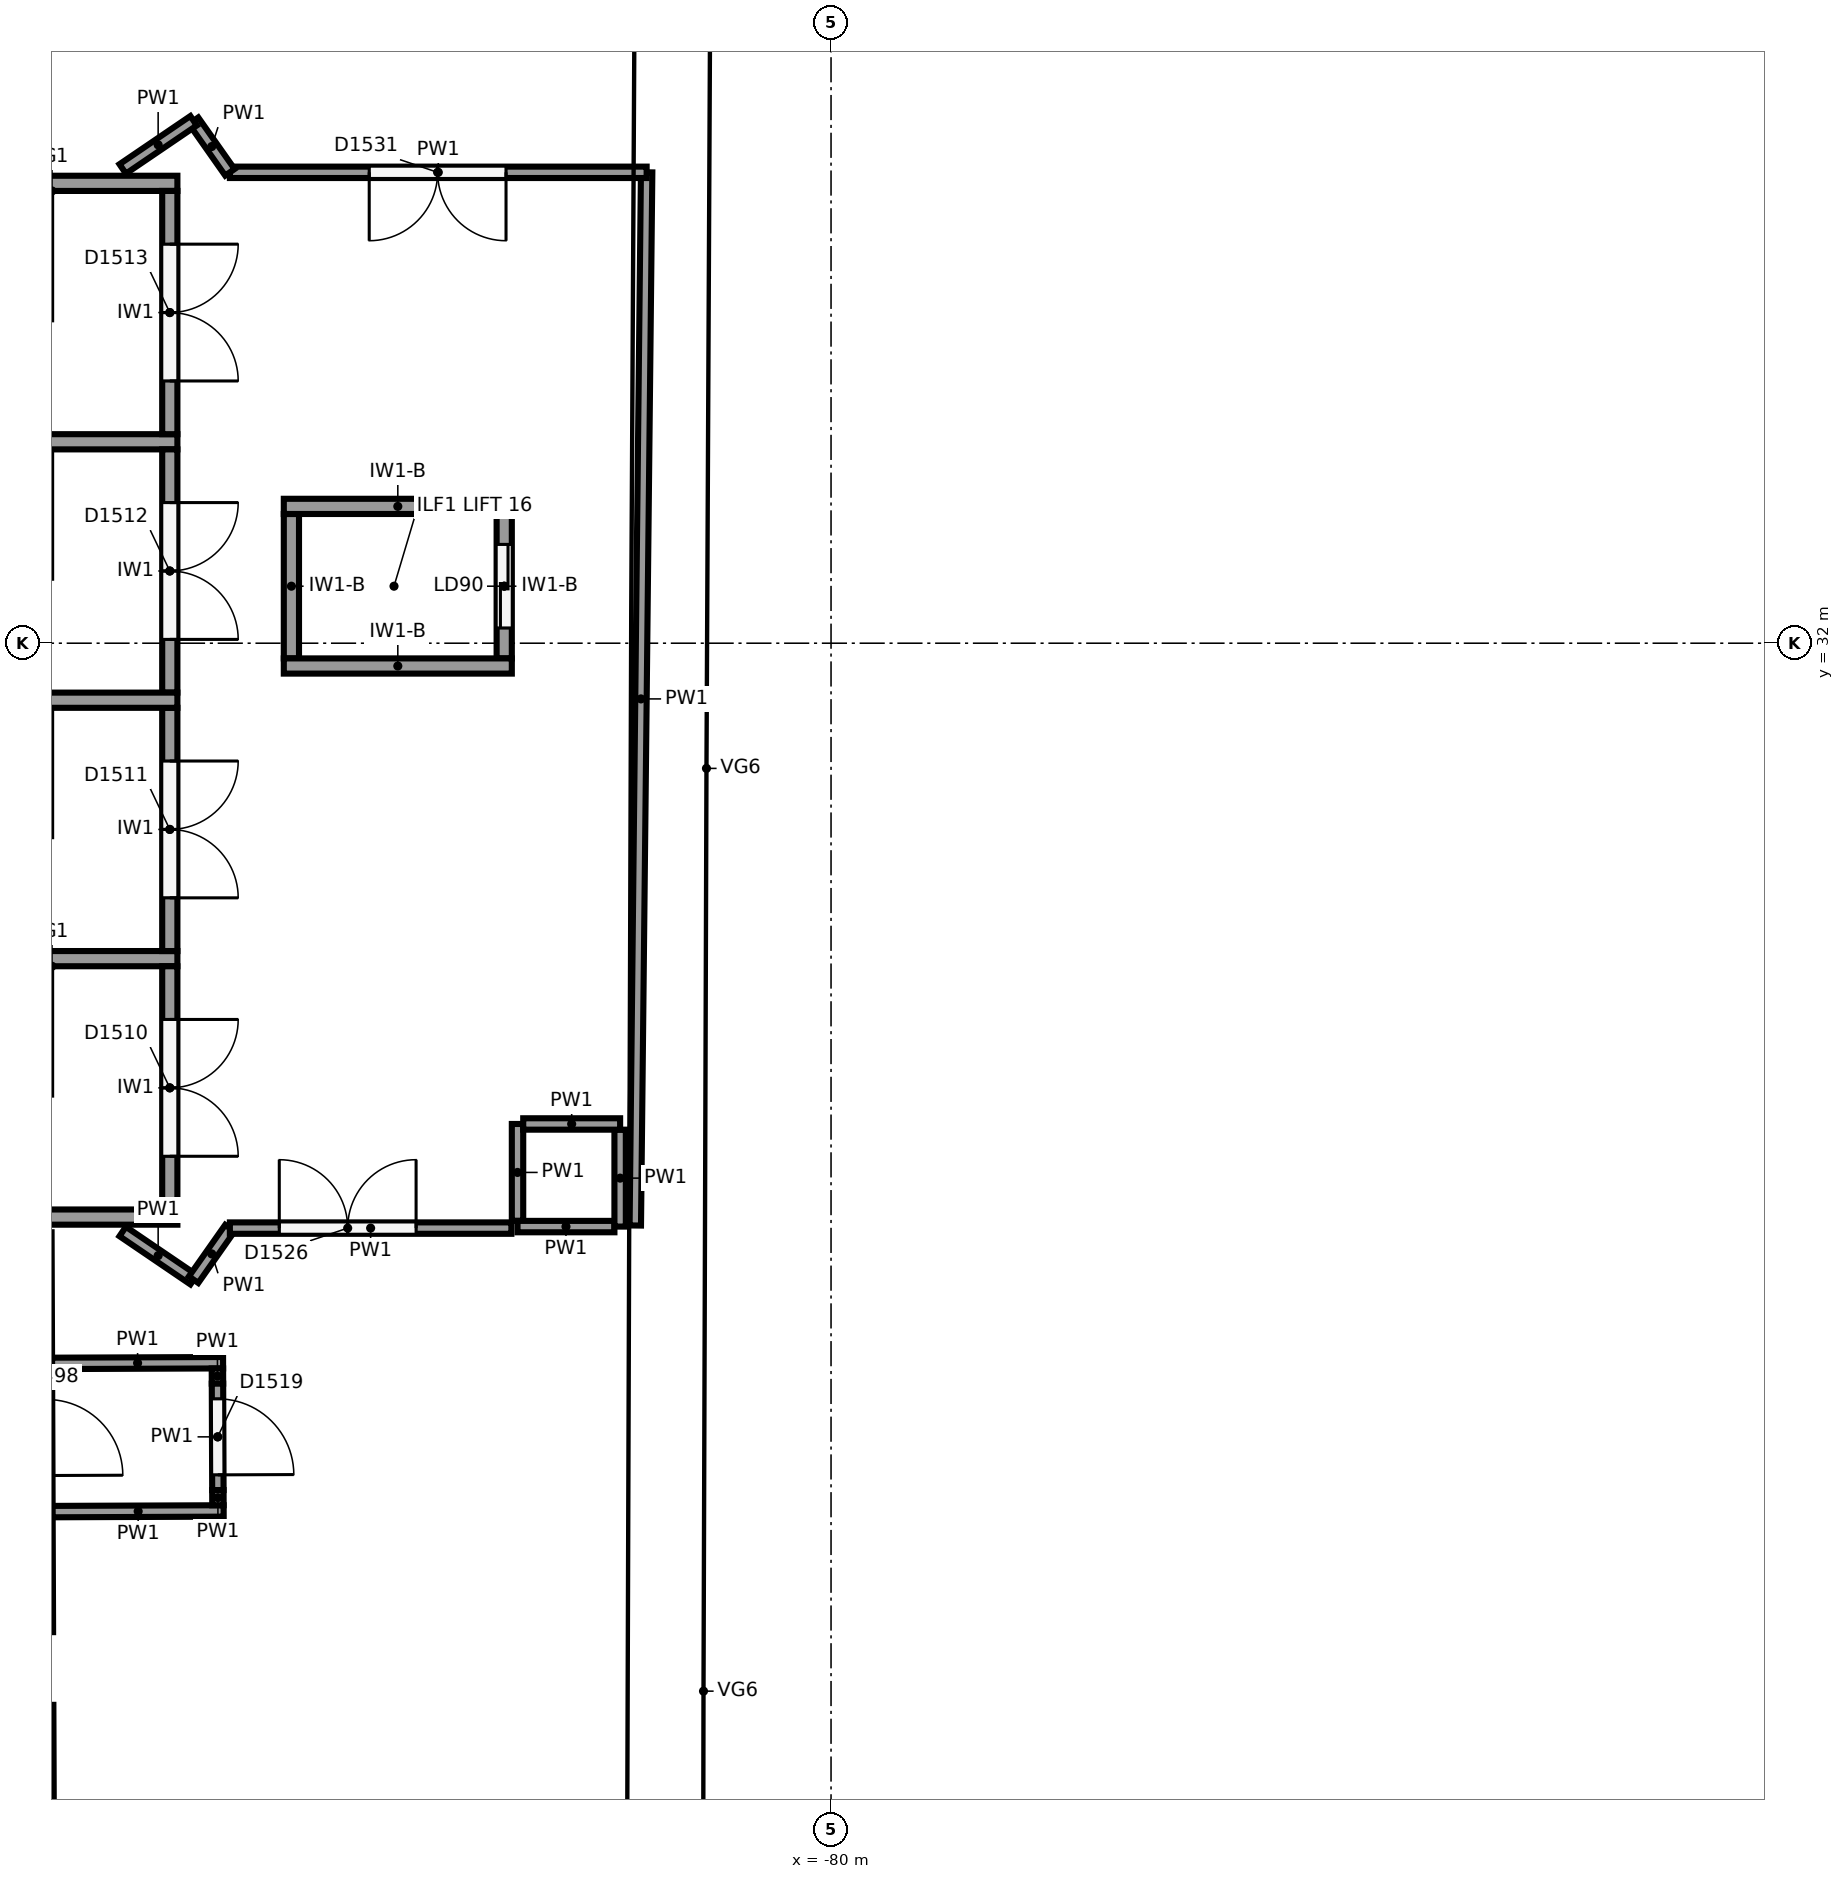
"""IFC4 building model, lengths in metres.
Left out: names, types, materials, properties, quantities, classifications, styles, units other than length and angle.
Written with IfcOpenShell. Run it as: python <this file> out.ifc"""

import sys

from ifc_helpers import new_model, si_unit, direction, frame, frame_2d, origin, origin_2d, place, context, subcontext, project, spatial, rectangle, circle, extrude, element, fill, save


model = new_model("IFC4")
c1 = context("Model", 3, precision=1e-05, world=origin(), true_north=direction((0.0, 1.0)))
c2 = subcontext(c1, "Body", "Model", "MODEL_VIEW")
j1 = project(units=[si_unit("LENGTHUNIT", "METRE"), si_unit("PLANEANGLEUNIT", "RADIAN")], contexts=[c1])
p1 = place(None, origin())
s1 = spatial("IfcSite", under=j1, at=p1, CompositionType="ELEMENT")
p2 = place(p1, origin())
s2 = spatial("IfcBuilding", under=s1, at=p2, CompositionType="ELEMENT")
p3 = place(p2, frame((0.0, 0.0, 24.0)))
s3 = spatial("IfcBuildingStorey", under=s2, at=p3, CompositionType="ELEMENT", Elevation=24.0)
p4 = place(p3, frame((-84.941, 30.404, 0.0), z_axis=(0.0, 0.0, 1.0), x_axis=(1.0, 0.0, 0.0)))
e1 = element("IfcColumn", 1, at=p4, inside=s3, PredefinedType="COLUMN", context=c2, shape_type="SweptSolid", body=[
    extrude(circle(Radius=0.6, at=origin_2d()), origin(), (0.0, 0.0, 1.0), 6.0),
])
p5 = place(p3, frame((-84.973, 18.411, 0.0), z_axis=(0.0, 0.0, 1.0), x_axis=(1.0, 0.0, 0.0)))
e2 = element("IfcColumn", 2, at=p5, inside=s3, PredefinedType="COLUMN", context=c2, shape_type="SweptSolid", body=[
    extrude(circle(Radius=0.5, at=origin_2d()), origin(), (0.0, 0.0, 1.0), 6.0),
])
for number, where, z_axis, x_axis in (
    (3, (-97.6, 38.05, 0.0), (0.0, 0.0, 1.0), (1.0, 0.0, 0.0)),
    (4, (-97.6, 31.25, 0.0), (0.0, 0.0, 1.0), (1.0, 0.0, 0.0)),
    (5, (-97.6, 24.45, 0.0), (0.0, 0.0, 1.0), (1.0, 0.0, 0.0)),
    (6, (-97.6, 34.65, 0.0), (0.0, 0.0, 1.0), (1.0, 0.0, 0.0)),
    (7, (-97.6, 27.85, 0.0), (0.0, 0.0, 1.0), (1.0, 0.0, 0.0)),
):
    element("IfcWall", number, at=place(p3, frame(where, z_axis=z_axis, x_axis=x_axis)), inside=s3, PredefinedType="SHEAR", context=c2, shape_type="SweptSolid", body=[
        extrude(rectangle(XDim=9.0, YDim=0.2, at=frame_2d((4.5, 0.0))), origin(), (0.0, 0.0, 1.0), 5.75),
    ])
p6 = place(p3, frame((-88.7, 37.95, 0.0), z_axis=(0.0, 0.0, 1.0), x_axis=(0.0, -1.0, 0.0)))
e8 = element("IfcWall", 8, at=p6, inside=s3, PredefinedType="SHEAR", context=c2, shape_type="SweptSolid", body=[
    extrude(rectangle(XDim=3.2, YDim=0.2, at=frame_2d((1.6, 0.0))), origin(), (0.0, 0.0, 1.0), 5.75),
])
p7 = place(p6, frame((0.7, 0.0, 0.0)))
e9 = element("IfcOpeningElement", 9, at=p7, cuts=e8, PredefinedType="OPENING", context=c2, shape_type="SweptSolid", body=[
    extrude(rectangle(XDim=1.8, YDim=2.1, at=frame_2d((0.9, 1.05))), frame((0.0, 0.11, 0.0), z_axis=(0.0, -1.0, 0.0), x_axis=(1.0, 0.0, 0.0)), (0.0, 0.0, 1.0), 0.22),
])
p8 = place(p3, frame((-88.7, 34.55, 0.0), z_axis=(0.0, 0.0, 1.0), x_axis=(0.0, -1.0, 0.0)))
e10 = element("IfcWall", 10, at=p8, inside=s3, PredefinedType="SHEAR", context=c2, shape_type="SweptSolid", body=[
    extrude(rectangle(XDim=3.2, YDim=0.2, at=frame_2d((1.6, 0.0))), origin(), (0.0, 0.0, 1.0), 5.75),
])
p9 = place(p8, frame((0.7, 0.0, 0.0)))
e11 = element("IfcOpeningElement", 11, at=p9, cuts=e10, PredefinedType="OPENING", context=c2, shape_type="SweptSolid", body=[
    extrude(rectangle(XDim=1.8, YDim=2.1, at=frame_2d((0.9, 1.05))), frame((0.0, 0.11, 0.0), z_axis=(0.0, -1.0, 0.0), x_axis=(1.0, 0.0, 0.0)), (0.0, 0.0, 1.0), 0.22),
])
p10 = place(p3, frame((-88.7, 31.15, 0.0), z_axis=(0.0, 0.0, 1.0), x_axis=(0.0, -1.0, 0.0)))
e12 = element("IfcWall", 12, at=p10, inside=s3, PredefinedType="SHEAR", context=c2, shape_type="SweptSolid", body=[
    extrude(rectangle(XDim=3.2, YDim=0.2, at=frame_2d((1.6, 0.0))), origin(), (0.0, 0.0, 1.0), 5.75),
])
p11 = place(p10, frame((0.7, 0.0, 0.0)))
e13 = element("IfcOpeningElement", 13, at=p11, cuts=e12, PredefinedType="OPENING", context=c2, shape_type="SweptSolid", body=[
    extrude(rectangle(XDim=1.8, YDim=2.1, at=frame_2d((0.9, 1.05))), frame((0.0, 0.11, 0.0), z_axis=(0.0, -1.0, 0.0), x_axis=(1.0, 0.0, 0.0)), (0.0, 0.0, 1.0), 0.22),
])
p12 = place(p3, frame((-88.7, 27.75, 0.0), z_axis=(0.0, 0.0, 1.0), x_axis=(0.0, -1.0, 0.0)))
e14 = element("IfcWall", 14, at=p12, inside=s3, PredefinedType="SHEAR", context=c2, shape_type="SweptSolid", body=[
    extrude(rectangle(XDim=3.2, YDim=0.2, at=frame_2d((1.6, 0.0))), origin(), (0.0, 0.0, 1.0), 5.75),
])
p13 = place(p12, frame((0.7, 0.0, 0.0)))
e15 = element("IfcOpeningElement", 15, at=p13, cuts=e14, PredefinedType="OPENING", context=c2, shape_type="SweptSolid", body=[
    extrude(rectangle(XDim=1.8, YDim=2.1, at=frame_2d((0.9, 1.05))), frame((0.0, 0.11, 0.0), z_axis=(0.0, -1.0, 0.0), x_axis=(1.0, 0.0, 0.0)), (0.0, 0.0, 1.0), 0.22),
])
for number, where, z_axis, x_axis in (
    (16, (-87.2, 33.8, 0.0), (0.0, 0.0, 1.0), (1.0, 0.0, 0.0)),
    (17, (-87.2, 31.7, 0.0), (0.0, 0.0, 1.0), (1.0, 0.0, 0.0)),
):
    element("IfcWall", number, at=place(p3, frame(where, z_axis=z_axis, x_axis=x_axis)), inside=s3, PredefinedType="SHEAR", context=c2, shape_type="SweptSolid", body=[
        extrude(rectangle(XDim=3.0, YDim=0.2, at=frame_2d((1.5, 0.0))), origin(), (0.0, 0.0, 1.0), 4.6),
    ])
p14 = place(p3, frame((-87.1, 33.7, 0.0), z_axis=(0.0, 0.0, 1.0), x_axis=(0.0, -1.0, 0.0)))
e18 = element("IfcWall", 18, at=p14, inside=s3, PredefinedType="SHEAR", context=c2, shape_type="SweptSolid", body=[
    extrude(rectangle(XDim=1.9, YDim=0.2, at=frame_2d((0.95, 0.0))), origin(), (0.0, 0.0, 1.0), 4.6),
])
p15 = place(p3, frame((-84.3, 33.7, 0.0), z_axis=(0.0, 0.0, 1.0), x_axis=(0.0, -1.0, 0.0)))
e19 = element("IfcWall", 19, at=p15, inside=s3, PredefinedType="SHEAR", context=c2, shape_type="SweptSolid", body=[
    extrude(rectangle(XDim=1.9, YDim=0.2, at=frame_2d((0.95, 0.0))), origin(), (0.0, 0.0, 1.0), 4.6),
])
p16 = place(p15, frame((0.4, 0.0, 0.0)))
e20 = element("IfcOpeningElement", 20, at=p16, cuts=e19, PredefinedType="OPENING", context=c2, shape_type="SweptSolid", body=[
    extrude(rectangle(XDim=1.1, YDim=2.1, at=frame_2d((0.55, 1.05))), frame((0.0, 0.11, 0.0), z_axis=(0.0, -1.0, 0.0), x_axis=(1.0, 0.0, 0.0)), (0.0, 0.0, 1.0), 0.22),
])
p17 = place(p3, frame((-90.33, 24.25, 0.0), z_axis=(0.0, 0.0, 1.0), x_axis=(0.003805253437, -0.999992759997, 0.0)))
e21 = element("IfcWall", 21, at=p17, inside=s3, PredefinedType="PARTITIONING", context=c2, shape_type="SweptSolid", body=[
    extrude(rectangle(XDim=5.261, YDim=0.15, at=frame_2d((2.63, 0.0))), origin(), (0.0, 0.0, 1.0), 5.4),
])
p18 = place(p17, frame((2.2, 0.0, 0.0)))
e22 = element("IfcOpeningElement", 22, at=p18, cuts=e21, PredefinedType="OPENING", context=c2, shape_type="SweptSolid", body=[
    extrude(rectangle(XDim=1.0, YDim=2.1, at=frame_2d((0.5, 1.05))), frame((0.0, 0.085, 0.0), z_axis=(0.0, -1.0, 0.0), x_axis=(1.0, 0.0, 0.0)), (0.0, 0.0, 1.0), 0.17),
])
p19 = place(p3, frame((-90.307, 18.033, 0.0), z_axis=(0.0, 0.0, 1.0), x_axis=(0.003777410518, -0.999992865559, 0.0)))
e23 = element("IfcWall", 23, at=p19, inside=s3, PredefinedType="PARTITIONING", context=c2, shape_type="SweptSolid", body=[
    extrude(rectangle(XDim=4.783, YDim=0.15, at=frame_2d((2.391, 0.0))), origin(), (0.0, 0.0, 1.0), 5.4),
])
p20 = place(p3, frame((-84.125, 25.675, 0.0), z_axis=(0.0, 0.0, 1.0), x_axis=(0.0, -1.0, 0.0)))
e24 = element("IfcWall", 24, at=p20, inside=s3, PredefinedType="PARTITIONING", context=c2, shape_type="SweptSolid", body=[
    extrude(rectangle(XDim=1.275, YDim=0.15, at=frame_2d((0.638, 0.0))), origin(), (0.0, 0.0, 1.0), 5.4),
])
p21 = place(p3, frame((-84.125, 24.325, 0.0), z_axis=(0.0, 0.0, 1.0), x_axis=(1.0, 0.0, 0.0)))
e25 = element("IfcWall", 25, at=p21, inside=s3, PredefinedType="PARTITIONING", context=c2, shape_type="SweptSolid", body=[
    extrude(rectangle(XDim=1.275, YDim=0.15, at=frame_2d((0.637, 0.0))), origin(), (0.0, 0.0, 1.0), 5.4),
])
for number, where, z_axis, x_axis in (
    (26, (-82.775, 24.325, 0.0), (0.0, 0.0, 1.0), (0.0, 1.0, 0.0)),
    (27, (-82.775, 25.675, 0.0), (0.0, 0.0, 1.0), (-1.0, 0.0, 0.0)),
):
    element("IfcWall", number, at=place(p3, frame(where, z_axis=z_axis, x_axis=x_axis)), inside=s3, PredefinedType="PARTITIONING", context=c2, shape_type="SweptSolid", body=[
        extrude(rectangle(XDim=1.275, YDim=0.15, at=frame_2d((0.638, 0.0))), origin(), (0.0, 0.0, 1.0), 5.4),
    ])
p22 = place(p3, frame((-89.32, 24.26, 0.0), z_axis=(0.0, 0.0, 1.0), x_axis=(0.827055308354, -0.562120553728, 0.0)))
e28 = element("IfcWall", 28, at=p22, inside=s3, PredefinedType="PARTITIONING", context=c2, shape_type="SweptSolid", body=[
    extrude(rectangle(XDim=1.128, YDim=0.15, at=frame_2d((0.564, 0.0))), origin(), (0.0, 0.0, 1.0), 5.4),
])
p23 = place(p3, frame((-88.387, 23.626, 0.0), z_axis=(0.0, 0.0, 1.0), x_axis=(0.575376756214, 0.817888493872, 0.0)))
e29 = element("IfcWall", 29, at=p23, inside=s3, PredefinedType="PARTITIONING", context=c2, shape_type="SweptSolid", body=[
    extrude(rectangle(XDim=0.83, YDim=0.15, at=frame_2d((0.415, 0.0))), origin(), (0.0, 0.0, 1.0), 5.4),
])
p24 = place(p3, frame((-87.909, 24.305, 0.0), z_axis=(0.0, 0.0, 1.0), x_axis=(1.0, 0.0, 0.0)))
e30 = element("IfcWall", 30, at=p24, inside=s3, PredefinedType="PARTITIONING", context=c2, shape_type="SweptSolid", body=[
    extrude(rectangle(XDim=3.704, YDim=0.15, at=frame_2d((1.852, 0.0))), origin(), (0.0, 0.0, 1.0), 5.4),
])
p25 = place(p24, frame((0.65, 0.0, 0.0)))
e31 = element("IfcOpeningElement", 31, at=p25, cuts=e30, PredefinedType="OPENING", context=c2, shape_type="SweptSolid", body=[
    extrude(rectangle(XDim=1.8, YDim=2.1, at=frame_2d((0.9, 1.05))), frame((0.0, 0.085, 0.0), z_axis=(0.0, -1.0, 0.0), x_axis=(1.0, 0.0, 0.0)), (0.0, 0.0, 1.0), 0.17),
])
p26 = place(p3, frame((-82.575, 24.339, 0.0), z_axis=(0.0, 0.0, 1.0), x_axis=(0.010765137173, 0.999942054232, 0.0)))
e32 = element("IfcWall", 32, at=p26, inside=s3, PredefinedType="PARTITIONING", context=c2, shape_type="SweptSolid", body=[
    extrude(rectangle(XDim=13.857, YDim=0.15, at=frame_2d((6.928, 0.0))), origin(), (0.0, 0.0, 1.0), 5.4),
])
p27 = place(p3, frame((-82.426, 38.195, 0.0), z_axis=(0.0, 0.0, 1.0), x_axis=(-1.0, 0.0, 0.0)))
e33 = element("IfcWall", 33, at=p27, inside=s3, PredefinedType="PARTITIONING", context=c2, shape_type="SweptSolid", body=[
    extrude(rectangle(XDim=5.483, YDim=0.15, at=frame_2d((2.741, 0.0))), origin(), (0.0, 0.0, 1.0), 5.4),
])
p28 = place(p27, frame((1.85, 0.0, 0.0)))
e34 = element("IfcOpeningElement", 34, at=p28, cuts=e33, PredefinedType="OPENING", context=c2, shape_type="SweptSolid", body=[
    extrude(rectangle(XDim=1.8, YDim=2.1, at=frame_2d((0.9, 1.05))), frame((0.0, 0.085, 0.0), z_axis=(0.0, -1.0, 0.0), x_axis=(1.0, 0.0, 0.0)), (0.0, 0.0, 1.0), 0.17),
])
p29 = place(p3, frame((-87.909, 38.195, 0.0), z_axis=(0.0, 0.0, 1.0), x_axis=(-0.575573582652, 0.81774999294, 0.0)))
e35 = element("IfcWall", 35, at=p29, inside=s3, PredefinedType="PARTITIONING", context=c2, shape_type="SweptSolid", body=[
    extrude(rectangle(XDim=0.83, YDim=0.15, at=frame_2d((0.415, 0.0))), origin(), (0.0, 0.0, 1.0), 5.4),
])
p30 = place(p3, frame((-88.387, 38.874, 0.0), z_axis=(0.0, 0.0, 1.0), x_axis=(-0.827055308354, -0.562120553728, 0.0)))
e36 = element("IfcWall", 36, at=p30, inside=s3, PredefinedType="PARTITIONING", context=c2, shape_type="SweptSolid", body=[
    extrude(rectangle(XDim=1.128, YDim=0.15, at=frame_2d((0.564, 0.0))), origin(), (0.0, 0.0, 1.0), 5.4),
])
for number, where, z_axis, x_axis in (
    (37, (-90.249, 22.525, 0.0), (0.0, 0.0, 1.0), (1.0, 0.004, 0.0)),
    (38, (-90.241, 20.575, 0.0), (0.0, 0.0, 1.0), (1.0, 0.004, 0.0)),
):
    element("IfcWall", number, at=place(p3, frame(where, z_axis=z_axis, x_axis=x_axis)), inside=s3, PredefinedType="PARTITIONING", context=c2, shape_type="SweptSolid", body=[
        extrude(rectangle(XDim=2.25, YDim=0.15, at=frame_2d((1.125, 0.0))), origin(), (0.0, 0.0, 1.0), 5.4),
    ])
p31 = place(p3, frame((-88.073, 22.458, 0.0), z_axis=(0.0, 0.0, 1.0), x_axis=(0.003662979089, -0.99999329127, 0.0)))
e39 = element("IfcWall", 39, at=p31, inside=s3, PredefinedType="PARTITIONING", context=c2, shape_type="SweptSolid", body=[
    extrude(rectangle(XDim=0.2, YDim=0.15, at=frame_2d((0.1, 0.0))), origin(), (0.0, 0.0, 1.0), 5.4),
])
p32 = place(p3, frame((-88.073, 22.259, 0.0), z_axis=(0.0, 0.0, 1.0), x_axis=(0.003836734927, -0.999992639705, 0.0)))
e40 = element("IfcWall", 40, at=p32, inside=s3, PredefinedType="PARTITIONING", context=c2, shape_type="SweptSolid", body=[
    extrude(rectangle(XDim=1.4, YDim=0.15, at=frame_2d((0.7, 0.0))), origin(), (0.0, 0.0, 1.0), 5.4),
])
p33 = place(p32, frame((0.2, 0.0, 0.0)))
e41 = element("IfcOpeningElement", 41, at=p33, cuts=e40, PredefinedType="OPENING", context=c2, shape_type="SweptSolid", body=[
    extrude(rectangle(XDim=1.0, YDim=2.1, at=frame_2d((0.5, 1.05))), frame((0.0, 0.085, 0.0), z_axis=(0.0, -1.0, 0.0), x_axis=(1.0, 0.0, 0.0)), (0.0, 0.0, 1.0), 0.17),
])
p34 = place(p3, frame((-88.067, 20.859, 0.0), z_axis=(0.0, 0.0, 1.0), x_axis=(0.003662979089, -0.99999329127, 0.0)))
e42 = element("IfcWall", 42, at=p34, inside=s3, PredefinedType="PARTITIONING", context=c2, shape_type="SweptSolid", body=[
    extrude(rectangle(XDim=0.2, YDim=0.15, at=frame_2d((0.1, 0.0))), origin(), (0.0, 0.0, 1.0), 5.4),
])
p35 = place(p7, origin())
e43 = element("IfcDoor", 43, at=p35, inside=s3, OperationType="DOUBLE_DOOR_SINGLE_SWING", PredefinedType="DOOR", context=c2, shape_type="SweptSolid", body=[
    extrude(rectangle(XDim=1.8, YDim=2.1, at=frame_2d((0.9, 1.05))), frame((0.0, 0.025, 0.0), z_axis=(0.0, -1.0, 0.0), x_axis=(1.0, 0.0, 0.0)), (0.0, 0.0, 1.0), 0.05),
])
fill(e9, e43)
p36 = place(p9, origin())
e44 = element("IfcDoor", 44, at=p36, inside=s3, OperationType="DOUBLE_DOOR_SINGLE_SWING", PredefinedType="DOOR", context=c2, shape_type="SweptSolid", body=[
    extrude(rectangle(XDim=1.8, YDim=2.1, at=frame_2d((0.9, 1.05))), frame((0.0, 0.025, 0.0), z_axis=(0.0, -1.0, 0.0), x_axis=(1.0, 0.0, 0.0)), (0.0, 0.0, 1.0), 0.05),
])
fill(e11, e44)
p37 = place(p11, origin())
e45 = element("IfcDoor", 45, at=p37, inside=s3, OperationType="DOUBLE_DOOR_SINGLE_SWING", PredefinedType="DOOR", context=c2, shape_type="SweptSolid", body=[
    extrude(rectangle(XDim=1.8, YDim=2.1, at=frame_2d((0.9, 1.05))), frame((0.0, 0.025, 0.0), z_axis=(0.0, -1.0, 0.0), x_axis=(1.0, 0.0, 0.0)), (0.0, 0.0, 1.0), 0.05),
])
fill(e13, e45)
p38 = place(p13, origin())
e46 = element("IfcDoor", 46, at=p38, inside=s3, OperationType="DOUBLE_DOOR_SINGLE_SWING", PredefinedType="DOOR", context=c2, shape_type="SweptSolid", body=[
    extrude(rectangle(XDim=1.8, YDim=2.1, at=frame_2d((0.9, 1.05))), frame((0.0, 0.025, 0.0), z_axis=(0.0, -1.0, 0.0), x_axis=(1.0, 0.0, 0.0)), (0.0, 0.0, 1.0), 0.05),
])
fill(e15, e46)
p39 = place(p16, origin())
e47 = element("IfcDoor", 47, at=p39, inside=s3, OperationType="SLIDING_TO_RIGHT", PredefinedType="DOOR", context=c2, shape_type="SweptSolid", body=[
    extrude(rectangle(XDim=1.1, YDim=2.1, at=frame_2d((0.55, 1.05))), frame((0.0, 0.025, 0.0), z_axis=(0.0, -1.0, 0.0), x_axis=(1.0, 0.0, 0.0)), (0.0, 0.0, 1.0), 0.05),
])
fill(e20, e47)
p40 = place(p28, origin())
e48 = element("IfcDoor", 48, at=p40, inside=s3, OperationType="DOUBLE_DOOR_SINGLE_SWING", PredefinedType="DOOR", context=c2, shape_type="SweptSolid", body=[
    extrude(rectangle(XDim=1.8, YDim=2.1, at=frame_2d((0.9, 1.05))), frame((0.0, 0.025, 0.0), z_axis=(0.0, -1.0, 0.0), x_axis=(1.0, 0.0, 0.0)), (0.0, 0.0, 1.0), 0.05),
])
fill(e34, e48)
p41 = place(p25, origin())
e49 = element("IfcDoor", 49, at=p41, inside=s3, OperationType="DOUBLE_DOOR_SINGLE_SWING", PredefinedType="DOOR", context=c2, shape_type="SweptSolid", body=[
    extrude(rectangle(XDim=1.8, YDim=2.1, at=frame_2d((0.9, 1.05))), frame((0.0, 0.025, 0.0), z_axis=(0.0, -1.0, 0.0), x_axis=(1.0, 0.0, 0.0)), (0.0, 0.0, 1.0), 0.05),
])
fill(e31, e49)
p42 = place(p33, origin())
e50 = element("IfcDoor", 50, at=p42, inside=s3, OperationType="SINGLE_SWING_RIGHT", PredefinedType="DOOR", context=c2, shape_type="SweptSolid", body=[
    extrude(rectangle(XDim=1.0, YDim=2.1, at=frame_2d((0.5, 1.05))), frame((0.0, 0.025, 0.0), z_axis=(0.0, -1.0, 0.0), x_axis=(1.0, 0.0, 0.0)), (0.0, 0.0, 1.0), 0.05),
])
fill(e41, e50)
save(model, sys.argv[1])
